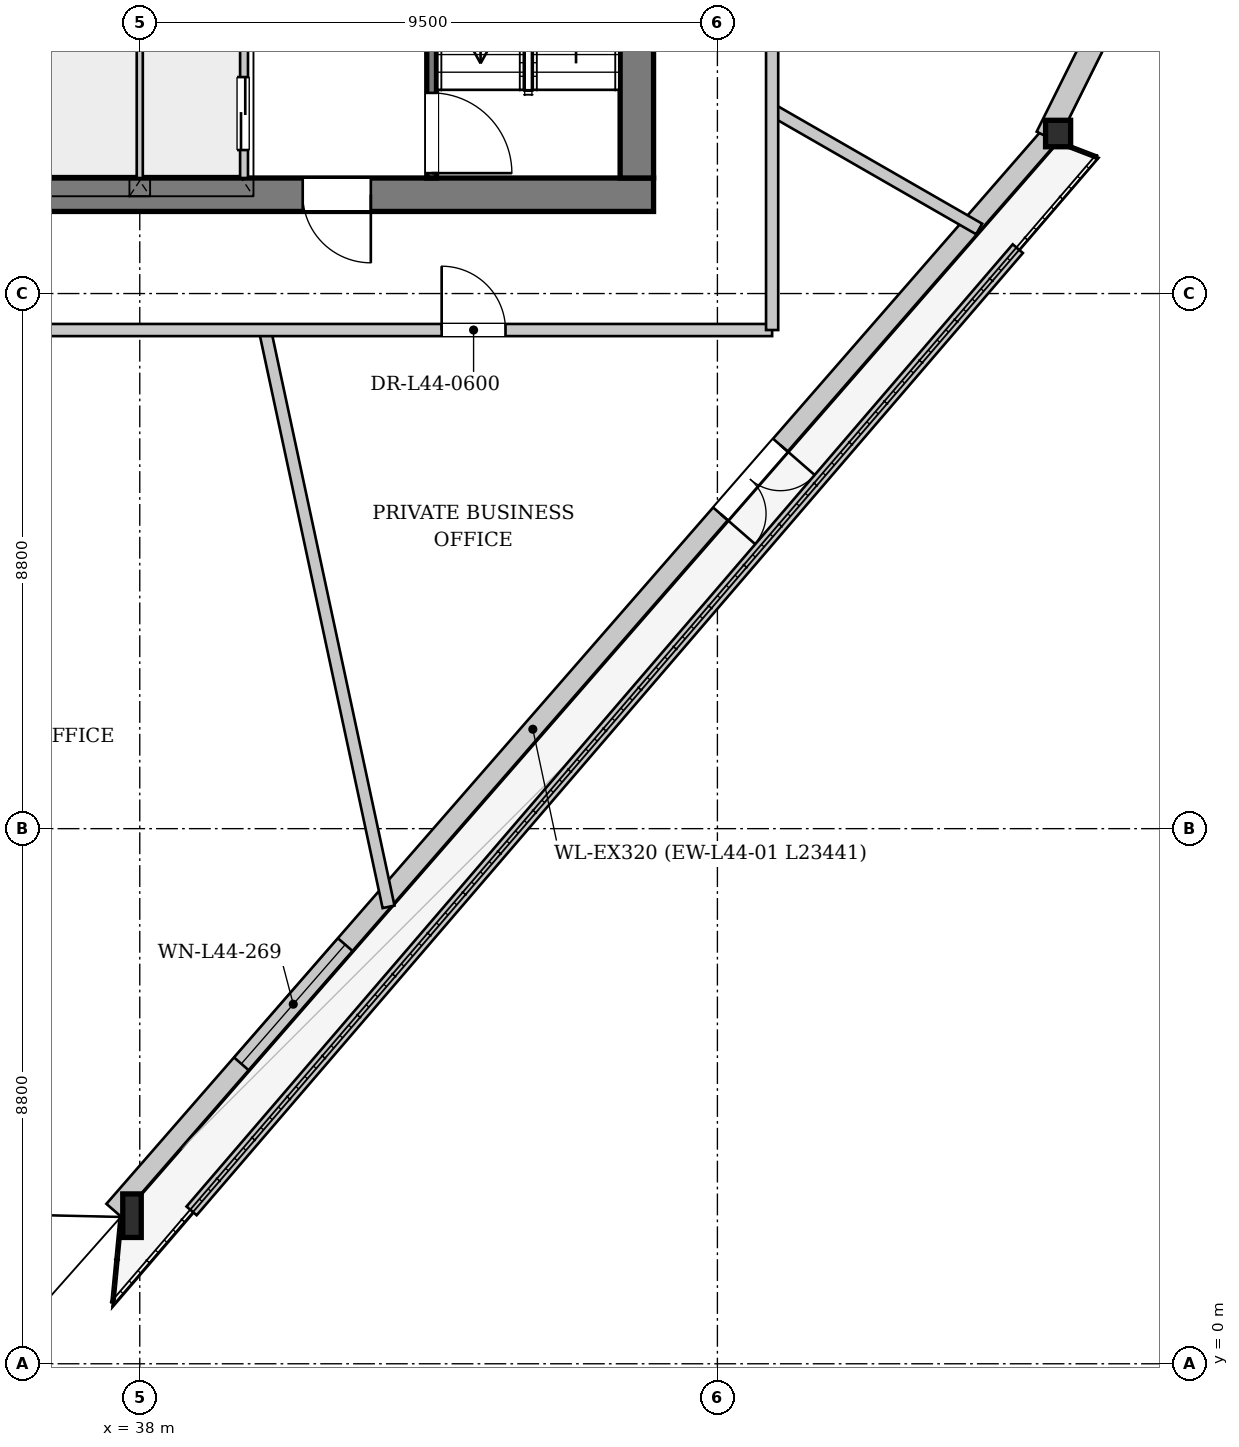
"""IFC4 building model, lengths in metres.
Left out: names, types, materials, properties, quantities, classifications, styles, units other than length and angle.
Written with IfcOpenShell. Run it as: python <this file> out.ifc"""

import sys

from ifc_helpers import new_model, si_unit, direction, frame, frame_2d, origin, origin_2d, place, context, subcontext, project, spatial, rectangle, i_section, extrude, source, transform, mapped, element, fill, save


model = new_model("IFC4")
c1 = context("Model", 3, precision=1e-05, world=origin(), true_north=direction((0.0, 1.0)))
c2 = subcontext(c1, "Body", "Model", "MODEL_VIEW")
j1 = project(units=[si_unit("LENGTHUNIT", "METRE"), si_unit("PLANEANGLEUNIT", "RADIAN")], contexts=[c1])
p1 = place(None, origin())
s1 = spatial("IfcSite", under=j1, at=p1, CompositionType="ELEMENT")
p2 = place(p1, origin())
s2 = spatial("IfcBuilding", under=s1, at=p2, CompositionType="ELEMENT")
p3 = place(p2, frame((0.0, 0.0, 167.9)))
s3 = spatial("IfcBuildingStorey", under=s2, at=p3, CompositionType="ELEMENT", Elevation=167.9)
m1 = source(origin(), c2, "Body", "SweptSolid", [
    extrude(i_section(OverallWidth=0.304, OverallDepth=0.716, WebThickness=0.021, FlangeThickness=0.04, at=origin_2d()), origin(), (0.0, 0.0, 1.0), 3.404),
])
p4 = place(p3, frame((37.692, 2.419, 0.0), z_axis=(0.105710612855, 0.009251471546, 0.994353899074), x_axis=(-0.08718371796, 0.996192250182, 0.0)))
e1 = element("IfcColumn", 1, at=p4, inside=s3, PredefinedType="COLUMN", context=c2, shape_type="MappedRepresentation", body=[
    mapped(m1, transform((0.0, 0.0, 0.0), x_axis=(1.0, 0.0, 0.0), y_axis=(0.0, 1.0, 0.0), z_axis=(0.0, 0.0, 1.0), scale=1.0)),
])
m2 = source(origin(), c2, "Body", "SweptSolid", [
    extrude(i_section(OverallWidth=0.412, OverallDepth=0.435, WebThickness=0.031, FlangeThickness=0.05, at=origin_2d()), origin(), (0.0, 0.0, 1.0), 3.396),
])
p5 = place(p3, frame((53.091, 20.093, 0.0), z_axis=(0.00718813238, 0.081657183832, 0.996634554429), x_axis=(-0.996147893688, 0.087689075149, 0.0)))
e2 = element("IfcColumn", 2, at=p5, inside=s3, PredefinedType="COLUMN", context=c2, shape_type="MappedRepresentation", body=[
    mapped(m2, transform((0.0, 0.0, 0.0), x_axis=(1.0, 0.0, 0.0), y_axis=(0.0, 1.0, 0.0), z_axis=(0.0, 0.0, 1.0), scale=1.0)),
])
p6 = place(p3, frame((52.97, 20.198, 0.0), z_axis=(0.0, 0.0, 1.0), x_axis=(-0.656914851648, -0.753964772177, 0.0)))
e3 = element("IfcWall", 3, at=p6, inside=s3, PredefinedType="SOLIDWALL", context=c2, shape_type="SweptSolid", body=[
    extrude(rectangle(XDim=23.44, YDim=0.32, at=frame_2d((11.72, 0.0))), origin(), (0.0, 0.0, 1.0), 2.722),
])
p7 = place(p6, frame((6.751, 0.0, 0.0)))
e4 = element("IfcOpeningElement", 4, at=p7, cuts=e3, PredefinedType="OPENING", context=c2, shape_type="SweptSolid", body=[
    extrude(rectangle(XDim=1.5, YDim=2.3, at=frame_2d((0.75, 1.15))), frame((0.0, 0.17, 0.0), z_axis=(0.0, -1.0, 0.0), x_axis=(1.0, 0.0, 0.0)), (0.0, 0.0, 1.0), 0.34),
])
p8 = place(p6, frame((17.646, 0.0, 0.252)))
e5 = element("IfcOpeningElement", 5, at=p8, cuts=e3, PredefinedType="OPENING", context=c2, shape_type="SweptSolid", body=[
    extrude(rectangle(XDim=2.6, YDim=2.35, at=frame_2d((1.3, 1.175))), frame((0.0, 0.17, 0.0), z_axis=(0.0, -1.0, 0.0), x_axis=(1.0, 0.0, 0.0)), (0.0, 0.0, 1.0), 0.34),
])
p9 = place(p3, frame((63.356, 41.167, 0.0), z_axis=(0.0, 0.0, 1.0), x_axis=(-0.44519188478, -0.895435193482, 0.0)))
e6 = element("IfcWall", 6, at=p9, inside=s3, PredefinedType="SOLIDWALL", context=c2, shape_type="SweptSolid", body=[
    extrude(rectangle(XDim=23.441, YDim=0.38, at=frame_2d((11.72, 0.0))), origin(), (0.0, 0.0, 1.0), 2.722),
])
p10 = place(p9, frame((7.063, 0.0, 0.352)))
e7 = element("IfcOpeningElement", 7, at=p10, cuts=e6, PredefinedType="OPENING", context=c2, shape_type="SweptSolid", body=[
    extrude(rectangle(XDim=2.2, YDim=2.25, at=frame_2d((1.1, 1.125))), frame((0.0, 0.2, 0.0), z_axis=(0.0, -1.0, 0.0), x_axis=(1.0, 0.0, 0.0)), (0.0, 0.0, 1.0), 0.4),
])
p11 = place(p9, frame((15.777, 0.0, 0.352)))
e8 = element("IfcOpeningElement", 8, at=p11, cuts=e6, PredefinedType="OPENING", context=c2, shape_type="SweptSolid", body=[
    extrude(rectangle(XDim=2.2, YDim=2.25, at=frame_2d((1.1, 1.125))), frame((0.0, 0.2, 0.0), z_axis=(0.0, -1.0, 0.0), x_axis=(1.0, 0.0, 0.0)), (0.0, 0.0, 1.0), 0.4),
])
p12 = place(p3, frame((38.852, 2.514, 0.0), z_axis=(0.0, 0.0, 1.0), x_axis=(0.651493813463, 0.758653946816, 0.0)))
e9 = element("IfcWall", 9, at=p12, inside=s3, PredefinedType="PARAPET", context=c2, shape_type="SweptSolid", body=[
    extrude(rectangle(XDim=20.858, YDim=0.22, at=frame_2d((10.429, 0.0))), origin(), (0.0, 0.0, 1.0), 0.3),
])
p13 = place(p3, frame((46.45, 19.225, 0.0), z_axis=(0.0, 0.0, 1.0), x_axis=(-1.0, 0.0, 0.0)))
e10 = element("IfcWall", 10, at=p13, inside=s3, PredefinedType="SHEAR", context=c2, shape_type="SweptSolid", body=[
    extrude(rectangle(XDim=16.9, YDim=0.55, at=frame_2d((8.45, 0.0))), origin(), (0.0, 0.0, 1.0), 3.33),
])
p14 = place(p13, frame((4.65, 0.0, 0.0)))
e11 = element("IfcOpeningElement", 11, at=p14, cuts=e10, PredefinedType="OPENING", context=c2, shape_type="SweptSolid", body=[
    extrude(rectangle(XDim=1.12, YDim=2.25, at=frame_2d((0.56, 1.125))), frame((0.0, 0.285, 0.0), z_axis=(0.0, -1.0, 0.0), x_axis=(1.0, 0.0, 0.0)), (0.0, 0.0, 1.0), 0.57),
])
p15 = place(p13, frame((11.15, 0.0, 0.0)))
e12 = element("IfcOpeningElement", 12, at=p15, cuts=e10, PredefinedType="OPENING", context=c2, shape_type="SweptSolid", body=[
    extrude(rectangle(XDim=1.12, YDim=2.25, at=frame_2d((0.56, 1.125))), frame((0.0, 0.285, 0.0), z_axis=(0.0, -1.0, 0.0), x_axis=(1.0, 0.0, 0.0)), (0.0, 0.0, 1.0), 0.57),
])
p16 = place(p3, frame((46.175, 33.7, 0.0), z_axis=(0.0, 0.0, 1.0), x_axis=(0.0, -1.0, 0.0)))
e13 = element("IfcWall", 13, at=p16, inside=s3, PredefinedType="SHEAR", context=c2, shape_type="SweptSolid", body=[
    extrude(rectangle(XDim=14.2, YDim=0.55, at=frame_2d((7.1, 0.0))), origin(), (0.0, 0.0, 1.0), 3.33),
])
p17 = place(p16, frame((5.18, 0.0, 0.0)))
e14 = element("IfcOpeningElement", 14, at=p17, cuts=e13, PredefinedType="OPENING", context=c2, shape_type="SweptSolid", body=[
    extrude(rectangle(XDim=1.6, YDim=2.2, at=frame_2d((0.8, 1.1))), frame((0.0, 0.285, 0.0), z_axis=(0.0, -1.0, 0.0), x_axis=(1.0, 0.0, 0.0)), (0.0, 0.0, 1.0), 0.57),
])
p18 = place(p16, frame((2.05, 0.0, 0.0)))
e15 = element("IfcOpeningElement", 15, at=p18, cuts=e13, PredefinedType="OPENING", context=c2, shape_type="SweptSolid", body=[
    extrude(rectangle(XDim=0.95, YDim=2.1, at=frame_2d((0.475, 1.05))), frame((0.0, 0.285, 0.0), z_axis=(0.0, -1.0, 0.0), x_axis=(1.0, 0.0, 0.0)), (0.0, 0.0, 1.0), 0.57),
])
p19 = place(p3, frame((42.8, 26.96, 0.0), z_axis=(0.0, 0.0, 1.0), x_axis=(0.0, -1.0, 0.0)))
e16 = element("IfcWall", 16, at=p19, inside=s3, PredefinedType="PARTITIONING", context=c2, shape_type="SweptSolid", body=[
    extrude(rectangle(XDim=7.46, YDim=0.16, at=frame_2d((3.73, 0.0))), origin(), (0.0, 0.0, 1.0), 3.33),
])
p20 = place(p19, frame((6.06, 0.0, 0.0)))
e17 = element("IfcOpeningElement", 17, at=p20, cuts=e16, PredefinedType="OPENING", context=c2, shape_type="SweptSolid", body=[
    extrude(rectangle(XDim=1.32, YDim=2.2, at=frame_2d((0.66, 1.1))), frame((0.0, 0.09, 0.0), z_axis=(0.0, -1.0, 0.0), x_axis=(1.0, 0.0, 0.0)), (0.0, 0.0, 1.0), 0.18),
])
p21 = place(p3, frame((39.7, 24.28, 0.0), z_axis=(0.0, 0.0, 1.0), x_axis=(0.0, -1.0, 0.0)))
e18 = element("IfcWall", 18, at=p21, inside=s3, PredefinedType="PARTITIONING", context=c2, shape_type="SweptSolid", body=[
    extrude(rectangle(XDim=4.78, YDim=0.16, at=frame_2d((2.39, 0.0))), origin(), (0.0, 0.0, 1.0), 3.33),
])
p22 = place(p21, frame((3.12, 0.0, 0.0)))
e19 = element("IfcOpeningElement", 19, at=p22, cuts=e18, PredefinedType="OPENING", context=c2, shape_type="SweptSolid", body=[
    extrude(rectangle(XDim=1.2, YDim=2.2, at=frame_2d((0.6, 1.1))), frame((0.0, 0.09, 0.0), z_axis=(0.0, -1.0, 0.0), x_axis=(1.0, 0.0, 0.0)), (0.0, 0.0, 1.0), 0.18),
])
p23 = place(p3, frame((38.0, 19.5, 0.0), z_axis=(0.0, 0.0, 1.0), x_axis=(0.0, 1.0, 0.0)))
e20 = element("IfcWall", 20, at=p23, inside=s3, PredefinedType="PARTITIONING", context=c2, shape_type="SweptSolid", body=[
    extrude(rectangle(XDim=2.46, YDim=0.125, at=frame_2d((1.23, 0.0))), origin(), (0.0, 0.0, 1.0), 3.33),
])
p24 = place(p3, frame((40.058, 17.0, 0.0), z_axis=(0.0, 0.0, 1.0), x_axis=(0.209628767646, -0.977781048996, 0.0)))
e21 = element("IfcWall", 21, at=p24, inside=s3, PredefinedType="PARTITIONING", context=c2, shape_type="SweptSolid", body=[
    extrude(rectangle(XDim=9.701, YDim=0.2, at=frame_2d((4.851, 0.0))), origin(), (0.0, 0.0, 1.0), 3.33),
])
p25 = place(p3, frame((48.4, 20.62, 0.0), z_axis=(0.0, 0.0, 1.0), x_axis=(0.866931821356, -0.498426741979, 0.0)))
e22 = element("IfcWall", 22, at=p25, inside=s3, PredefinedType="PARTITIONING", context=c2, shape_type="SweptSolid", body=[
    extrude(rectangle(XDim=3.927, YDim=0.2, at=frame_2d((1.964, 0.0))), origin(), (0.0, 0.0, 1.0), 3.33),
])
p26 = place(p3, frame((27.6, 17.0, 0.0), z_axis=(0.0, 0.0, 1.0), x_axis=(1.0, 0.0, 0.0)))
e23 = element("IfcWall", 23, at=p26, inside=s3, PredefinedType="PARTITIONING", context=c2, shape_type="SweptSolid", body=[
    extrude(rectangle(XDim=20.8, YDim=0.2, at=frame_2d((10.4, 0.0))), origin(), (0.0, 0.0, 1.0), 3.33),
])
p27 = place(p26, frame((6.615, 0.0, 0.0)))
e24 = element("IfcOpeningElement", 24, at=p27, cuts=e23, PredefinedType="OPENING", context=c2, shape_type="SweptSolid", body=[
    extrude(rectangle(XDim=1.05, YDim=2.2, at=frame_2d((0.525, 1.1))), frame((0.0, 0.11, 0.0), z_axis=(0.0, -1.0, 0.0), x_axis=(1.0, 0.0, 0.0)), (0.0, 0.0, 1.0), 0.22),
])
p28 = place(p26, frame((15.365, 0.0, 0.0)))
e25 = element("IfcOpeningElement", 25, at=p28, cuts=e23, PredefinedType="OPENING", context=c2, shape_type="SweptSolid", body=[
    extrude(rectangle(XDim=1.05, YDim=2.2, at=frame_2d((0.525, 1.1))), frame((0.0, 0.11, 0.0), z_axis=(0.0, -1.0, 0.0), x_axis=(1.0, 0.0, 0.0)), (0.0, 0.0, 1.0), 0.22),
])
p29 = place(p3, frame((48.4, 17.0, 0.0), z_axis=(0.0, 0.0, 1.0), x_axis=(0.0, 1.0, 0.0)))
e26 = element("IfcWall", 26, at=p29, inside=s3, PredefinedType="PARTITIONING", context=c2, shape_type="SweptSolid", body=[
    extrude(rectangle(XDim=19.2, YDim=0.2, at=frame_2d((9.6, 0.0))), origin(), (0.0, 0.0, 1.0), 3.33),
])
p30 = place(p29, frame((7.999, 0.0, 0.0)))
e27 = element("IfcOpeningElement", 27, at=p30, cuts=e26, PredefinedType="OPENING", context=c2, shape_type="SweptSolid", body=[
    extrude(rectangle(XDim=1.05, YDim=2.2, at=frame_2d((0.525, 1.1))), frame((0.0, 0.11, 0.0), z_axis=(0.0, -1.0, 0.0), x_axis=(1.0, 0.0, 0.0)), (0.0, 0.0, 1.0), 0.22),
])
m3 = source(origin(), c2, "Body", "SweptSolid", [
    extrude(rectangle(XDim=1.5, YDim=2.3, at=frame_2d((0.75, 1.15))), frame((0.0, 0.025, 0.0), z_axis=(0.0, -1.0, 0.0), x_axis=(1.0, 0.0, 0.0)), (0.0, 0.0, 1.0), 0.05),
])
p31 = place(p7, origin())
e28 = element("IfcDoor", 28, at=p31, inside=s3, OperationType="DOUBLE_DOOR_SINGLE_SWING", PredefinedType="DOOR", context=c2, shape_type="MappedRepresentation", body=[
    mapped(m3, transform((0.0, 0.0, 0.0), x_axis=(1.0, 0.0, 0.0), y_axis=(0.0, 1.0, 0.0), z_axis=(0.0, 0.0, 1.0), scale=1.0)),
])
fill(e4, e28)
m4 = source(origin(), c2, "Body", "SweptSolid", [
    extrude(rectangle(XDim=2.6, YDim=2.35, at=frame_2d((1.3, 1.175))), frame((0.0, 0.03, 0.0), z_axis=(0.0, -1.0, 0.0), x_axis=(1.0, 0.0, 0.0)), (0.0, 0.0, 1.0), 0.06),
])
p32 = place(p8, origin())
e29 = element("IfcWindow", 29, at=p32, inside=s3, PartitioningType="SINGLE_PANEL", PredefinedType="WINDOW", context=c2, shape_type="MappedRepresentation", body=[
    mapped(m4, transform((0.0, 0.0, 0.0), x_axis=(1.0, 0.0, 0.0), y_axis=(0.0, 1.0, 0.0), z_axis=(0.0, 0.0, 1.0), scale=1.0)),
])
fill(e5, e29)
m5 = source(origin(), c2, "Body", "SweptSolid", [
    extrude(rectangle(XDim=1.12, YDim=2.25, at=frame_2d((0.56, 1.125))), frame((0.0, 0.025, 0.0), z_axis=(0.0, -1.0, 0.0), x_axis=(1.0, 0.0, 0.0)), (0.0, 0.0, 1.0), 0.05),
])
p33 = place(p14, origin())
e30 = element("IfcDoor", 30, at=p33, inside=s3, OperationType="SINGLE_SWING_LEFT", PredefinedType="DOOR", context=c2, shape_type="MappedRepresentation", body=[
    mapped(m5, transform((0.0, 0.0, 0.0), x_axis=(1.0, 0.0, 0.0), y_axis=(0.0, 1.0, 0.0), z_axis=(0.0, 0.0, 1.0), scale=1.0)),
])
fill(e11, e30)
m6 = source(origin(), c2, "Body", "SweptSolid", [
    extrude(rectangle(XDim=1.32, YDim=2.2, at=frame_2d((0.66, 1.1))), frame((0.0, 0.025, 0.0), z_axis=(0.0, -1.0, 0.0), x_axis=(1.0, 0.0, 0.0)), (0.0, 0.0, 1.0), 0.05),
])
p34 = place(p20, origin())
e31 = element("IfcDoor", 31, at=p34, inside=s3, OperationType="SINGLE_SWING_RIGHT", PredefinedType="DOOR", context=c2, shape_type="MappedRepresentation", body=[
    mapped(m6, transform((0.0, 0.0, 0.0), x_axis=(1.0, 0.0, 0.0), y_axis=(0.0, 1.0, 0.0), z_axis=(0.0, 0.0, 1.0), scale=1.0)),
])
fill(e17, e31)
m7 = source(origin(), c2, "Body", "SweptSolid", [
    extrude(rectangle(XDim=1.2, YDim=2.2, at=frame_2d((0.6, 1.1))), frame((0.0, 0.025, 0.0), z_axis=(0.0, -1.0, 0.0), x_axis=(1.0, 0.0, 0.0)), (0.0, 0.0, 1.0), 0.05),
])
p35 = place(p22, origin())
e32 = element("IfcDoor", 32, at=p35, inside=s3, OperationType="DOUBLE_DOOR_SLIDING", PredefinedType="DOOR", context=c2, shape_type="MappedRepresentation", body=[
    mapped(m7, transform((0.0, 0.0, 0.0), x_axis=(1.0, 0.0, 0.0), y_axis=(0.0, 1.0, 0.0), z_axis=(0.0, 0.0, 1.0), scale=1.0)),
])
fill(e19, e32)
m8 = source(origin(), c2, "Body", "SweptSolid", [
    extrude(rectangle(XDim=1.05, YDim=2.2, at=frame_2d((0.525, 1.1))), frame((0.0, 0.025, 0.0), z_axis=(0.0, -1.0, 0.0), x_axis=(1.0, 0.0, 0.0)), (0.0, 0.0, 1.0), 0.05),
])
p36 = place(p28, origin())
e33 = element("IfcDoor", 33, at=p36, inside=s3, OperationType="SINGLE_SWING_LEFT", PredefinedType="DOOR", context=c2, shape_type="MappedRepresentation", body=[
    mapped(m8, transform((0.0, 0.0, 0.0), x_axis=(1.0, 0.0, 0.0), y_axis=(0.0, 1.0, 0.0), z_axis=(0.0, 0.0, 1.0), scale=1.0)),
])
fill(e25, e33)
save(model, sys.argv[1])
